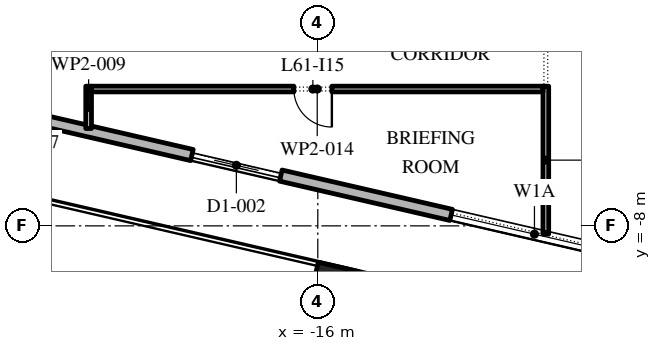
"""IFC4 building model, lengths in metres.
Left out: names, types, materials, properties, quantities, classifications, styles, units other than length and angle.
Written with IfcOpenShell. Run it as: python <this file> out.ifc"""

import sys

from ifc_helpers import new_model, si_unit, direction, frame, frame_2d, origin, origin_2d, place, context, subcontext, project, spatial, rectangle, extrude, element, fill, save


model = new_model("IFC4")
c1 = context("Model", 3, precision=1e-05, world=origin(), true_north=direction((0.0, 1.0)))
c2 = subcontext(c1, "Body", "Model", "MODEL_VIEW")
j1 = project(units=[si_unit("LENGTHUNIT", "METRE"), si_unit("PLANEANGLEUNIT", "RADIAN")], contexts=[c1])
p1 = place(None, origin())
s1 = spatial("IfcSite", under=j1, at=p1, CompositionType="ELEMENT")
p2 = place(p1, origin())
s2 = spatial("IfcBuilding", under=s1, at=p2, CompositionType="ELEMENT")
p3 = place(p2, frame((0.0, 0.0, 280.8)))
s3 = spatial("IfcBuildingStorey", under=s2, at=p3, CompositionType="ELEMENT", Elevation=280.8)
p4 = place(p3, frame((-15.574, -9.617, 0.0), z_axis=(0.0, 0.0, 1.0), x_axis=(0.974370064785, -0.224951054344, 0.0)))
e1 = element("IfcColumn", 1, at=p4, inside=s3, PredefinedType="COLUMN", context=c2, shape_type="SweptSolid", body=[
    extrude(rectangle(XDim=1.1, YDim=1.1, at=origin_2d()), origin(), (0.0, 0.0, 1.0), 4.2),
])
p5 = place(p3, frame((-29.616, -3.758, 0.0), z_axis=(0.0, 0.0, 1.0), x_axis=(0.974370532314, -0.224949029246, 0.0)))
e2 = element("IfcWall", 2, at=p5, inside=s3, PredefinedType="STANDARD", context=c2, shape_type="SweptSolid", body=[
    extrude(rectangle(XDim=48.0, YDim=0.3, at=frame_2d((24.0, 0.0))), origin(), (0.0, 0.0, 1.0), 4.0),
])
p6 = place(p5, frame((1.625, 0.0, 0.45)))
e3 = element("IfcOpeningElement", 3, at=p6, cuts=e2, PredefinedType="OPENING", context=c2, shape_type="SweptSolid", body=[
    extrude(rectangle(XDim=4.5, YDim=3.05, at=frame_2d((2.25, 1.525))), frame((0.0, 0.16, 0.0), z_axis=(0.0, -1.0, 0.0), x_axis=(1.0, 0.0, 0.0)), (0.0, 0.0, 1.0), 0.32),
])
p7 = place(p5, frame((10.575, 0.0, 0.0)))
e4 = element("IfcOpeningElement", 4, at=p7, cuts=e2, PredefinedType="OPENING", context=c2, shape_type="SweptSolid", body=[
    extrude(rectangle(XDim=2.4, YDim=3.5, at=frame_2d((1.2, 1.75))), frame((0.0, 0.16, 0.0), z_axis=(0.0, -1.0, 0.0), x_axis=(1.0, 0.0, 0.0)), (0.0, 0.0, 1.0), 0.32),
])
p8 = place(p5, frame((17.575, 0.0, 0.45)))
e5 = element("IfcOpeningElement", 5, at=p8, cuts=e2, PredefinedType="OPENING", context=c2, shape_type="SweptSolid", body=[
    extrude(rectangle(XDim=4.5, YDim=3.0, at=frame_2d((2.25, 1.5))), frame((0.0, 0.16, 0.0), z_axis=(0.0, -1.0, 0.0), x_axis=(1.0, 0.0, 0.0)), (0.0, 0.0, 1.0), 0.32),
])
p9 = place(p5, frame((25.625, 0.0, 0.45)))
e6 = element("IfcOpeningElement", 6, at=p9, cuts=e2, PredefinedType="OPENING", context=c2, shape_type="SweptSolid", body=[
    extrude(rectangle(XDim=4.5, YDim=2.95, at=frame_2d((2.25, 1.475))), frame((0.0, 0.16, 0.0), z_axis=(0.0, -1.0, 0.0), x_axis=(1.0, 0.0, 0.0)), (0.0, 0.0, 1.0), 0.32),
])
p10 = place(p5, frame((33.675, 0.0, 0.45)))
e7 = element("IfcOpeningElement", 7, at=p10, cuts=e2, PredefinedType="OPENING", context=c2, shape_type="SweptSolid", body=[
    extrude(rectangle(XDim=4.5, YDim=2.825, at=frame_2d((2.25, 1.413))), frame((0.0, 0.16, 0.0), z_axis=(0.0, -1.0, 0.0), x_axis=(1.0, 0.0, 0.0)), (0.0, 0.0, 1.0), 0.32),
])
p11 = place(p5, frame((42.775, 0.0, 0.0)))
e8 = element("IfcOpeningElement", 8, at=p11, cuts=e2, PredefinedType="OPENING", context=c2, shape_type="SweptSolid", body=[
    extrude(rectangle(XDim=2.4, YDim=3.5, at=frame_2d((1.2, 1.75))), frame((0.0, 0.16, 0.0), z_axis=(0.0, -1.0, 0.0), x_axis=(1.0, 0.0, 0.0)), (0.0, 0.0, 1.0), 0.32),
])
p12 = place(p3, frame((-22.03, -4.325, 0.0), z_axis=(0.0, 0.0, 1.0), x_axis=(0.0, -1.0, 0.0)))
e9 = element("IfcWall", 9, at=p12, inside=s3, PredefinedType="PARTITIONING", context=c2, shape_type="SweptSolid", body=[
    extrude(rectangle(XDim=1.113, YDim=0.15, at=frame_2d((0.557, 0.0))), origin(), (0.0, 0.0, 1.0), 4.0),
])
p13 = place(p3, frame((-10.0, -8.216, 0.0), z_axis=(0.0, 0.0, 1.0), x_axis=(0.0, 1.0, 0.0)))
e10 = element("IfcWall", 10, at=p13, inside=s3, PredefinedType="PARTITIONING", context=c2, shape_type="SweptSolid", body=[
    extrude(rectangle(XDim=3.891, YDim=0.15, at=frame_2d((1.946, 0.0))), origin(), (0.0, 0.0, 1.0), 4.0),
])
p14 = place(p3, frame((-10.075, -4.4, 0.0), z_axis=(0.0, 0.0, 1.0), x_axis=(-1.0, 0.0, 0.0)))
e11 = element("IfcWall", 11, at=p14, inside=s3, PredefinedType="PARTITIONING", context=c2, shape_type="SweptSolid", body=[
    extrude(rectangle(XDim=11.88, YDim=0.15, at=frame_2d((5.94, 0.0))), origin(), (0.0, 0.0, 1.0), 4.0),
])
p15 = place(p14, frame((5.555, 0.0, 0.0)))
e12 = element("IfcOpeningElement", 12, at=p15, cuts=e11, PredefinedType="OPENING", context=c2, shape_type="SweptSolid", body=[
    extrude(rectangle(XDim=1.0, YDim=2.1, at=frame_2d((0.5, 1.05))), frame((0.0, 0.085, 0.0), z_axis=(0.0, -1.0, 0.0), x_axis=(1.0, 0.0, 0.0)), (0.0, 0.0, 1.0), 0.17),
])
p16 = place(p7, origin())
e13 = element("IfcDoor", 13, at=p16, inside=s3, OperationType="DOUBLE_DOOR_SLIDING", PredefinedType="DOOR", context=c2, shape_type="SweptSolid", body=[
    extrude(rectangle(XDim=2.4, YDim=3.5, at=frame_2d((1.2, 1.75))), frame((0.0, 0.025, 0.0), z_axis=(0.0, -1.0, 0.0), x_axis=(1.0, 0.0, 0.0)), (0.0, 0.0, 1.0), 0.05),
])
fill(e4, e13)
p17 = place(p8, origin())
e14 = element("IfcWindow", 14, at=p17, inside=s3, PartitioningType="DOUBLE_PANEL_VERTICAL", PredefinedType="WINDOW", context=c2, shape_type="SweptSolid", body=[
    extrude(rectangle(XDim=4.5, YDim=3.0, at=frame_2d((2.25, 1.5))), frame((0.0, 0.03, 0.0), z_axis=(0.0, -1.0, 0.0), x_axis=(1.0, 0.0, 0.0)), (0.0, 0.0, 1.0), 0.06),
])
fill(e5, e14)
p18 = place(p15, origin())
e15 = element("IfcDoor", 15, at=p18, inside=s3, OperationType="SINGLE_SWING_RIGHT", PredefinedType="DOOR", context=c2, shape_type="SweptSolid", body=[
    extrude(rectangle(XDim=1.0, YDim=2.1, at=frame_2d((0.5, 1.05))), frame((0.0, 0.025, 0.0), z_axis=(0.0, -1.0, 0.0), x_axis=(1.0, 0.0, 0.0)), (0.0, 0.0, 1.0), 0.05),
])
fill(e12, e15)
save(model, sys.argv[1])
